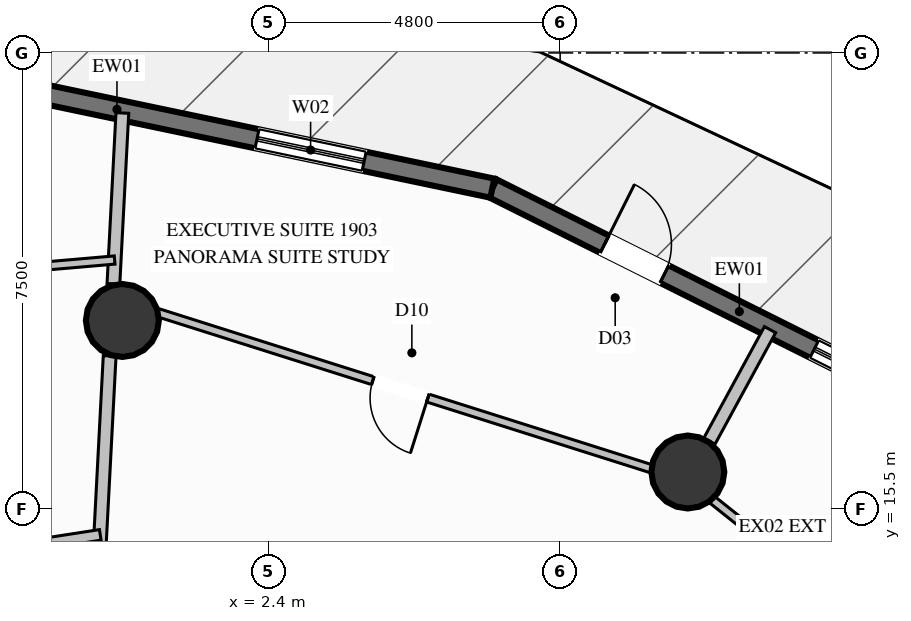
"""IFC4 building model, lengths in metres.
Left out: names, types, materials, properties, quantities, classifications, styles, units other than length and angle.
Written with IfcOpenShell. Run it as: python <this file> out.ifc"""

import sys

from ifc_helpers import new_model, si_unit, direction, frame, frame_2d, origin, origin_2d, place, context, subcontext, project, spatial, rectangle, circle, extrude, element, fill, save


model = new_model("IFC4")
c1 = context("Model", 3, precision=1e-05, world=origin(), true_north=direction((0.0, 1.0)))
c2 = subcontext(c1, "Body", "Model", "MODEL_VIEW")
j1 = project(units=[si_unit("LENGTHUNIT", "METRE"), si_unit("PLANEANGLEUNIT", "RADIAN")], contexts=[c1])
p1 = place(None, origin())
s1 = spatial("IfcSite", under=j1, at=p1, CompositionType="ELEMENT")
p2 = place(p1, origin())
s2 = spatial("IfcBuilding", under=s1, at=p2, CompositionType="ELEMENT")
p3 = place(p2, frame((0.0, 0.0, 71.6)))
s3 = spatial("IfcBuildingStorey", under=s2, at=p3, CompositionType="ELEMENT", Elevation=71.6)
for number, where, z_axis, x_axis in (
    (1, (9.3, 16.108, 0.0), (0.0, 0.0, 1.0), (1.0, 0.0, 0.0)),
    (2, (0.0, 18.6, 0.0), (0.0, 0.0, 1.0), (1.0, 0.0, 0.0)),
):
    element("IfcColumn", number, at=place(p3, frame(where, z_axis=z_axis, x_axis=x_axis)), inside=s3, PredefinedType="COLUMN", context=c2, shape_type="SweptSolid", body=[
        extrude(circle(Radius=0.6, at=origin_2d()), origin(), (0.0, 0.0, 1.0), 3.6),
    ])
p4 = place(p3, frame((6.085, 20.776, 0.0), z_axis=(0.0, 0.0, 1.0), x_axis=(0.894560654667, -0.446946568532, 0.0)))
e3 = element("IfcWall", 3, at=p4, inside=s3, PredefinedType="SOLIDWALL", context=c2, shape_type="SweptSolid", body=[
    extrude(rectangle(XDim=8.412, YDim=0.32, at=frame_2d((4.206, 0.0))), origin(), (0.0, 0.0, 1.0), 3.34),
])
p5 = place(p4, frame((5.919, 0.0, 0.35)))
e4 = element("IfcOpeningElement", 4, at=p5, cuts=e3, PredefinedType="OPENING", context=c2, shape_type="SweptSolid", body=[
    extrude(rectangle(XDim=1.8, YDim=2.6, at=frame_2d((0.9, 1.3))), frame((0.0, 0.17, 0.0), z_axis=(0.0, -1.0, 0.0), x_axis=(1.0, 0.0, 0.0)), (0.0, 0.0, 1.0), 0.34),
])
p6 = place(p4, frame((2.063, 0.0, 0.0)))
e5 = element("IfcOpeningElement", 5, at=p6, cuts=e3, PredefinedType="OPENING", context=c2, shape_type="SweptSolid", body=[
    extrude(rectangle(XDim=1.1, YDim=2.2, at=frame_2d((0.55, 1.1))), frame((0.0, 0.17, 0.0), z_axis=(0.0, -1.0, 0.0), x_axis=(1.0, 0.0, 0.0)), (0.0, 0.0, 1.0), 0.34),
])
p7 = place(p3, frame((-2.148, 22.503, 0.0), z_axis=(0.0, 0.0, 1.0), x_axis=(0.978697953962, -0.205305418609, 0.0)))
e6 = element("IfcWall", 6, at=p7, inside=s3, PredefinedType="SOLIDWALL", context=c2, shape_type="SweptSolid", body=[
    extrude(rectangle(XDim=8.412, YDim=0.32, at=frame_2d((4.206, 0.0))), origin(), (0.0, 0.0, 1.0), 3.34),
])
p8 = place(p7, frame((4.458, 0.0, 0.35)))
e7 = element("IfcOpeningElement", 7, at=p8, cuts=e6, PredefinedType="OPENING", context=c2, shape_type="SweptSolid", body=[
    extrude(rectangle(XDim=1.8, YDim=2.6, at=frame_2d((0.9, 1.3))), frame((0.0, 0.17, 0.0), z_axis=(0.0, -1.0, 0.0), x_axis=(1.0, 0.0, 0.0)), (0.0, 0.0, 1.0), 0.34),
])
p9 = place(p3, frame((-0.55, 11.5, 0.0), z_axis=(0.0, 0.0, 1.0), x_axis=(0.052270148933, 0.998632981395, 0.0)))
e8 = element("IfcWall", 8, at=p9, inside=s3, PredefinedType="PARTITIONING", context=c2, shape_type="SweptSolid", body=[
    extrude(rectangle(XDim=6.525, YDim=0.21, at=frame_2d((3.263, 0.0))), origin(), (0.0, 0.0, 1.0), 3.34),
])
p10 = place(p3, frame((-0.147, 19.202, 0.0), z_axis=(0.0, 0.0, 1.0), x_axis=(0.052230954764, 0.998635032114, 0.0)))
e9 = element("IfcWall", 9, at=p10, inside=s3, PredefinedType="PARTITIONING", context=c2, shape_type="SweptSolid", body=[
    extrude(rectangle(XDim=2.814, YDim=0.21, at=frame_2d((1.407, 0.0))), origin(), (0.0, 0.0, 1.0), 3.34),
])
p11 = place(p3, frame((9.655, 16.616, 0.0), z_axis=(0.0, 0.0, 1.0), x_axis=(0.477835310057, 0.878449438763, 0.0)))
e10 = element("IfcWall", 10, at=p11, inside=s3, PredefinedType="PARTITIONING", context=c2, shape_type="SweptSolid", body=[
    extrude(rectangle(XDim=2.087, YDim=0.21, at=frame_2d((1.043, 0.0))), origin(), (0.0, 0.0, 1.0), 3.34),
])
p12 = place(p3, frame((17.157, 9.701, 0.0), z_axis=(0.0, 0.0, 1.0), x_axis=(-0.78155569477, 0.623835471878, 0.0)))
e11 = element("IfcWall", 11, at=p12, inside=s3, PredefinedType="PARTITIONING", context=c2, shape_type="SweptSolid", body=[
    extrude(rectangle(XDim=10.049, YDim=0.135, at=frame_2d((5.024, 0.0))), origin(), (0.0, 0.0, 1.0), 2.793),
])
p13 = place(p12, frame((4.55, 0.0, 0.0)))
e12 = element("IfcOpeningElement", 12, at=p13, cuts=e11, PredefinedType="OPENING", context=c2, shape_type="SweptSolid", body=[
    extrude(rectangle(XDim=0.95, YDim=2.1, at=frame_2d((0.475, 1.05))), frame((0.0, 0.078, 0.0), z_axis=(0.0, -1.0, 0.0), x_axis=(1.0, 0.0, 0.0)), (0.0, 0.0, 1.0), 0.155),
])
p14 = place(p3, frame((9.303, 15.97, 0.0), z_axis=(0.0, 0.0, 1.0), x_axis=(-0.953412993278, 0.301668135953, 0.0)))
e13 = element("IfcWall", 13, at=p14, inside=s3, PredefinedType="PARTITIONING", context=c2, shape_type="SweptSolid", body=[
    extrude(rectangle(XDim=9.925, YDim=0.135, at=frame_2d((4.963, 0.0))), origin(), (0.0, 0.0, 1.0), 2.793),
])
p15 = place(p14, frame((4.488, 0.0, 0.0)))
e14 = element("IfcOpeningElement", 14, at=p15, cuts=e13, PredefinedType="OPENING", context=c2, shape_type="SweptSolid", body=[
    extrude(rectangle(XDim=0.95, YDim=2.1, at=frame_2d((0.475, 1.05))), frame((0.0, 0.078, 0.0), z_axis=(0.0, -1.0, 0.0), x_axis=(1.0, 0.0, 0.0)), (0.0, 0.0, 1.0), 0.155),
])
p16 = place(p3, frame((-0.363, 15.074, 0.0), z_axis=(0.0, 0.0, 1.0), x_axis=(-0.988289486539, -0.152590598654, 0.0)))
e15 = element("IfcWall", 15, at=p16, inside=s3, PredefinedType="PLUMBINGWALL", context=c2, shape_type="SweptSolid", body=[
    extrude(rectangle(XDim=3.611, YDim=0.175, at=frame_2d((1.806, 0.0))), origin(), (0.0, 0.0, 1.0), 3.34),
])
p17 = place(p3, frame((-0.127, 19.594, 0.0), z_axis=(0.0, 0.0, 1.0), x_axis=(-0.99630221434, -0.085917970765, 0.0)))
e16 = element("IfcWall", 16, at=p17, inside=s3, PredefinedType="PARTITIONING", context=c2, shape_type="SweptSolid", body=[
    extrude(rectangle(XDim=11.0, YDim=0.135, at=frame_2d((5.5, 0.0))), origin(), (0.0, 0.0, 1.0), 3.34),
])
p18 = place(p17, frame((5.025, 0.0, 0.0)))
e17 = element("IfcOpeningElement", 17, at=p18, cuts=e16, PredefinedType="OPENING", context=c2, shape_type="SweptSolid", body=[
    extrude(rectangle(XDim=0.95, YDim=2.1, at=frame_2d((0.475, 1.05))), frame((0.0, 0.078, 0.0), z_axis=(0.0, -1.0, 0.0), x_axis=(1.0, 0.0, 0.0)), (0.0, 0.0, 1.0), 0.155),
])
p19 = place(p5, origin())
e18 = element("IfcWindow", 18, at=p19, inside=s3, PartitioningType="SINGLE_PANEL", PredefinedType="WINDOW", context=c2, shape_type="SweptSolid", body=[
    extrude(rectangle(XDim=1.8, YDim=2.6, at=frame_2d((0.9, 1.3))), frame((0.0, 0.03, 0.0), z_axis=(0.0, -1.0, 0.0), x_axis=(1.0, 0.0, 0.0)), (0.0, 0.0, 1.0), 0.06),
])
fill(e4, e18)
p20 = place(p6, origin())
e19 = element("IfcDoor", 19, at=p20, inside=s3, OperationType="SINGLE_SWING_LEFT", PredefinedType="DOOR", context=c2, shape_type="SweptSolid", body=[
    extrude(rectangle(XDim=1.1, YDim=2.2, at=frame_2d((0.55, 1.1))), frame((0.0, 0.025, 0.0), z_axis=(0.0, -1.0, 0.0), x_axis=(1.0, 0.0, 0.0)), (0.0, 0.0, 1.0), 0.05),
])
fill(e5, e19)
p21 = place(p8, origin())
e20 = element("IfcWindow", 20, at=p21, inside=s3, PartitioningType="SINGLE_PANEL", PredefinedType="WINDOW", context=c2, shape_type="SweptSolid", body=[
    extrude(rectangle(XDim=1.8, YDim=2.6, at=frame_2d((0.9, 1.3))), frame((0.0, 0.03, 0.0), z_axis=(0.0, -1.0, 0.0), x_axis=(1.0, 0.0, 0.0)), (0.0, 0.0, 1.0), 0.06),
])
fill(e7, e20)
p22 = place(p15, origin())
e21 = element("IfcDoor", 21, at=p22, inside=s3, OperationType="SINGLE_SWING_LEFT", PredefinedType="DOOR", context=c2, shape_type="SweptSolid", body=[
    extrude(rectangle(XDim=0.95, YDim=2.1, at=frame_2d((0.475, 1.05))), frame((0.0, 0.025, 0.0), z_axis=(0.0, -1.0, 0.0), x_axis=(1.0, 0.0, 0.0)), (0.0, 0.0, 1.0), 0.05),
])
fill(e14, e21)
save(model, sys.argv[1])
